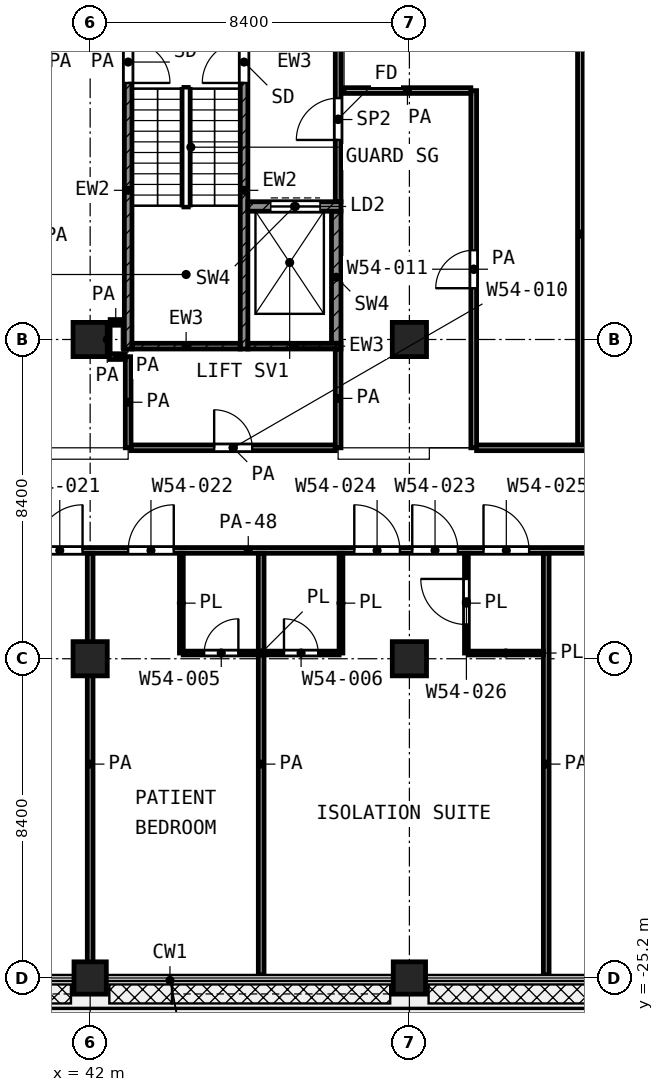
"""IFC4 building model, lengths in metres.
Left out: names, types, materials, properties, quantities, classifications, styles, units other than length and angle.
Written with IfcOpenShell. Run it as: python <this file> out.ifc"""

import sys

from ifc_helpers import new_model, si_unit, direction, frame, frame_2d, origin, origin_2d, place, context, subcontext, project, spatial, rectangle, extrude, element, fill, save


model = new_model("IFC4")
c1 = context("Model", 3, precision=1e-05, world=origin(), true_north=direction((0.0, 1.0)))
c2 = subcontext(c1, "Body", "Model", "MODEL_VIEW")
j1 = project(units=[si_unit("LENGTHUNIT", "METRE"), si_unit("PLANEANGLEUNIT", "RADIAN")], contexts=[c1])
p1 = place(None, origin())
s1 = spatial("IfcSite", under=j1, at=p1, CompositionType="ELEMENT")
p2 = place(p1, origin())
s2 = spatial("IfcBuilding", under=s1, at=p2, CompositionType="ELEMENT")
p3 = place(p2, frame((0.0, 0.0, 255.8)))
s3 = spatial("IfcBuildingStorey", under=s2, at=p3, CompositionType="ELEMENT", Elevation=255.8)
for number, where, z_axis, x_axis in (
    (1, (42.0, -8.4, 0.0), (0.0, 0.0, 1.0), (1.0, 0.0, 0.0)),
    (2, (50.4, -8.4, 0.0), (0.0, 0.0, 1.0), (1.0, 0.0, 0.0)),
    (3, (42.0, -16.8, 0.0), (0.0, 0.0, 1.0), (1.0, 0.0, 0.0)),
    (4, (50.4, -16.8, 0.0), (0.0, 0.0, 1.0), (1.0, 0.0, 0.0)),
):
    element("IfcColumn", number, at=place(p3, frame(where, z_axis=z_axis, x_axis=x_axis)), inside=s3, PredefinedType="COLUMN", context=c2, shape_type="SweptSolid", body=[
        extrude(rectangle(XDim=0.9, YDim=0.9, at=origin_2d()), origin(), (0.0, 0.0, 1.0), 4.2),
    ])
for number, where, z_axis, x_axis in (
    (5, (42.0, -25.2, 0.0), (0.0, 0.0, 1.0), (1.0, 0.0, 0.0)),
    (6, (50.4, -25.2, 0.0), (0.0, 0.0, 1.0), (1.0, 0.0, 0.0)),
):
    element("IfcColumn", number, at=place(p3, frame(where, z_axis=z_axis, x_axis=x_axis)), inside=s3, PredefinedType="COLUMN", context=c2, shape_type="SweptSolid", body=[
        extrude(rectangle(XDim=0.85, YDim=0.85, at=origin_2d()), origin(), (0.0, 0.0, 1.0), 4.2),
    ])
p4 = place(p3, frame((43.0, -8.65, 0.0), z_axis=(0.0, 0.0, 1.0), x_axis=(0.0, 1.0, 0.0)))
e7 = element("IfcWall", 7, at=p4, inside=s3, PredefinedType="SHEAR", context=c2, shape_type="SweptSolid", body=[
    extrude(rectangle(XDim=8.35, YDim=0.2, at=frame_2d((4.175, 0.0))), origin(), (0.0, 0.0, 1.0), 3.6),
])
p5 = place(p4, frame((7.0, 0.0, 0.0)))
e8 = element("IfcOpeningElement", 8, at=p5, cuts=e7, PredefinedType="OPENING", context=c2, shape_type="SweptSolid", body=[
    extrude(rectangle(XDim=1.1, YDim=2.1, at=frame_2d((0.55, 1.05))), frame((0.0, 0.11, 0.0), z_axis=(0.0, -1.0, 0.0), x_axis=(1.0, 0.0, 0.0)), (0.0, 0.0, 1.0), 0.22),
])
p6 = place(p3, frame((46.05, -8.65, 0.0), z_axis=(0.0, 0.0, 1.0), x_axis=(0.0, 1.0, 0.0)))
e9 = element("IfcWall", 9, at=p6, inside=s3, PredefinedType="SHEAR", context=c2, shape_type="SweptSolid", body=[
    extrude(rectangle(XDim=8.35, YDim=0.2, at=frame_2d((4.175, 0.0))), origin(), (0.0, 0.0, 1.0), 3.6),
])
p7 = place(p6, frame((7.0, 0.0, 0.0)))
e10 = element("IfcOpeningElement", 10, at=p7, cuts=e9, PredefinedType="OPENING", context=c2, shape_type="SweptSolid", body=[
    extrude(rectangle(XDim=1.1, YDim=2.1, at=frame_2d((0.55, 1.05))), frame((0.0, 0.11, 0.0), z_axis=(0.0, -1.0, 0.0), x_axis=(1.0, 0.0, 0.0)), (0.0, 0.0, 1.0), 0.22),
])
p8 = place(p3, frame((43.1, -8.575, 0.0), z_axis=(0.0, 0.0, 1.0), x_axis=(1.0, 0.0, 0.0)))
e11 = element("IfcWall", 11, at=p8, inside=s3, PredefinedType="SHEAR", context=c2, shape_type="SweptSolid", body=[
    extrude(rectangle(XDim=2.85, YDim=0.15, at=frame_2d((1.425, 0.0))), origin(), (0.0, 0.0, 1.0), 3.6),
])
p9 = place(p3, frame((46.15, -8.575, 0.0), z_axis=(0.0, 0.0, 1.0), x_axis=(1.0, 0.0, 0.0)))
e12 = element("IfcWall", 12, at=p9, inside=s3, PredefinedType="SHEAR", context=c2, shape_type="SweptSolid", body=[
    extrude(rectangle(XDim=2.45, YDim=0.15, at=frame_2d((1.225, 0.0))), origin(), (0.0, 0.0, 1.0), 3.6),
])
p10 = place(p3, frame((46.15, -4.9, 0.0), z_axis=(0.0, 0.0, 1.0), x_axis=(1.0, 0.0, 0.0)))
e13 = element("IfcWall", 13, at=p10, inside=s3, PredefinedType="SHEAR", context=c2, shape_type="SweptSolid", body=[
    extrude(rectangle(XDim=2.45, YDim=0.25, at=frame_2d((1.225, 0.0))), origin(), (0.0, 0.0, 1.0), 3.6),
])
p11 = place(p10, frame((0.6, 0.0, 0.0)))
e14 = element("IfcOpeningElement", 14, at=p11, cuts=e13, PredefinedType="OPENING", context=c2, shape_type="SweptSolid", body=[
    extrude(rectangle(XDim=1.3, YDim=2.1, at=frame_2d((0.65, 1.05))), frame((0.0, 0.135, 0.0), z_axis=(0.0, -1.0, 0.0), x_axis=(1.0, 0.0, 0.0)), (0.0, 0.0, 1.0), 0.27),
])
p12 = place(p3, frame((48.475, -8.5, 0.0), z_axis=(0.0, 0.0, 1.0), x_axis=(0.0, 1.0, 0.0)))
e15 = element("IfcWall", 15, at=p12, inside=s3, PredefinedType="SHEAR", context=c2, shape_type="SweptSolid", body=[
    extrude(rectangle(XDim=3.475, YDim=0.25, at=frame_2d((1.738, 0.0))), origin(), (0.0, 0.0, 1.0), 3.6),
])
p13 = place(p3, frame((48.525, -4.775, 0.0), z_axis=(0.0, 0.0, 1.0), x_axis=(0.0, 1.0, 0.0)))
e16 = element("IfcWall", 16, at=p13, inside=s3, PredefinedType="PARTITIONING", context=c2, shape_type="SweptSolid", body=[
    extrude(rectangle(XDim=4.325, YDim=0.15, at=frame_2d((2.163, 0.0))), origin(), (0.0, 0.0, 1.0), 3.6),
])
p14 = place(p13, frame((1.625, 0.0, 0.0)))
e17 = element("IfcOpeningElement", 17, at=p14, cuts=e16, PredefinedType="OPENING", context=c2, shape_type="SweptSolid", body=[
    extrude(rectangle(XDim=1.1, YDim=2.1, at=frame_2d((0.55, 1.05))), frame((0.0, 0.085, 0.0), z_axis=(0.0, -1.0, 0.0), x_axis=(1.0, 0.0, 0.0)), (0.0, 0.0, 1.0), 0.17),
])
p15 = place(p3, frame((44.45, -16.65, 0.0), z_axis=(0.0, 0.0, 1.0), x_axis=(1.0, 0.0, 0.0)))
e18 = element("IfcWall", 18, at=p15, inside=s3, PredefinedType="PARTITIONING", context=c2, shape_type="SweptSolid", body=[
    extrude(rectangle(XDim=4.1, YDim=0.1, at=frame_2d((2.05, 0.0))), origin(), (0.0, 0.0, 1.0), 3.6),
])
p16 = place(p15, frame((0.55, 0.0, 0.0)))
e19 = element("IfcOpeningElement", 19, at=p16, cuts=e18, PredefinedType="OPENING", context=c2, shape_type="SweptSolid", body=[
    extrude(rectangle(XDim=0.9, YDim=2.1, at=frame_2d((0.45, 1.05))), frame((0.0, 0.06, 0.0), z_axis=(0.0, -1.0, 0.0), x_axis=(1.0, 0.0, 0.0)), (0.0, 0.0, 1.0), 0.12),
])
p17 = place(p15, frame((2.65, 0.0, 0.0)))
e20 = element("IfcOpeningElement", 20, at=p17, cuts=e18, PredefinedType="OPENING", context=c2, shape_type="SweptSolid", body=[
    extrude(rectangle(XDim=0.9, YDim=2.1, at=frame_2d((0.45, 1.05))), frame((0.0, 0.06, 0.0), z_axis=(0.0, -1.0, 0.0), x_axis=(1.0, 0.0, 0.0)), (0.0, 0.0, 1.0), 0.12),
])
p18 = place(p3, frame((51.95, -16.65, 0.0), z_axis=(0.0, 0.0, 1.0), x_axis=(1.0, 0.0, 0.0)))
e21 = element("IfcWall", 21, at=p18, inside=s3, PredefinedType="PARTITIONING", context=c2, shape_type="SweptSolid", body=[
    extrude(rectangle(XDim=1.975, YDim=0.1, at=frame_2d((0.988, 0.0))), origin(), (0.0, 0.0, 1.0), 3.6),
])
for number, where, z_axis, x_axis in (
    (22, (44.4, -16.65, 0.0), (0.0, 0.0, 1.0), (0.0, 1.0, 0.0)),
    (23, (48.6, -16.65, 0.0), (0.0, 0.0, 1.0), (0.0, 1.0, 0.0)),
):
    element("IfcWall", number, at=place(p3, frame(where, z_axis=z_axis, x_axis=x_axis)), inside=s3, PredefinedType="PARTITIONING", context=c2, shape_type="SweptSolid", body=[
        extrude(rectangle(XDim=2.625, YDim=0.1, at=frame_2d((1.312, 0.0))), origin(), (0.0, 0.0, 1.0), 3.6),
    ])
p19 = place(p3, frame((51.9, -16.65, 0.0), z_axis=(0.0, 0.0, 1.0), x_axis=(0.0, 1.0, 0.0)))
e24 = element("IfcWall", 24, at=p19, inside=s3, PredefinedType="PARTITIONING", context=c2, shape_type="SweptSolid", body=[
    extrude(rectangle(XDim=2.625, YDim=0.1, at=frame_2d((1.312, 0.0))), origin(), (0.0, 0.0, 1.0), 3.6),
])
p20 = place(p19, frame((0.75, 0.0, 0.0)))
e25 = element("IfcOpeningElement", 25, at=p20, cuts=e24, PredefinedType="OPENING", context=c2, shape_type="SweptSolid", body=[
    extrude(rectangle(XDim=1.2, YDim=2.1, at=frame_2d((0.6, 1.05))), frame((0.0, 0.06, 0.0), z_axis=(0.0, -1.0, 0.0), x_axis=(1.0, 0.0, 0.0)), (0.0, 0.0, 1.0), 0.12),
])
p21 = place(p3, frame((29.4, -13.95, 0.0), z_axis=(0.0, 0.0, 1.0), x_axis=(1.0, 0.0, 0.0)))
e26 = element("IfcWall", 26, at=p21, inside=s3, PredefinedType="PARTITIONING", context=c2, shape_type="SweptSolid", body=[
    extrude(rectangle(XDim=33.52, YDim=0.15, at=frame_2d((16.76, 0.0))), origin(), (0.0, 0.0, 1.0), 2.7),
])
p22 = place(p21, frame((3.45, 0.0, 0.0)))
e27 = element("IfcOpeningElement", 27, at=p22, cuts=e26, PredefinedType="OPENING", context=c2, shape_type="SweptSolid", body=[
    extrude(rectangle(XDim=1.2, YDim=2.1, at=frame_2d((0.6, 1.05))), frame((0.0, 0.085, 0.0), z_axis=(0.0, -1.0, 0.0), x_axis=(1.0, 0.0, 0.0)), (0.0, 0.0, 1.0), 0.17),
])
p23 = place(p21, frame((11.2, 0.0, 0.0)))
e28 = element("IfcOpeningElement", 28, at=p23, cuts=e26, PredefinedType="OPENING", context=c2, shape_type="SweptSolid", body=[
    extrude(rectangle(XDim=1.2, YDim=2.1, at=frame_2d((0.6, 1.05))), frame((0.0, 0.085, 0.0), z_axis=(0.0, -1.0, 0.0), x_axis=(1.0, 0.0, 0.0)), (0.0, 0.0, 1.0), 0.17),
])
p24 = place(p21, frame((13.6, 0.0, 0.0)))
e29 = element("IfcOpeningElement", 29, at=p24, cuts=e26, PredefinedType="OPENING", context=c2, shape_type="SweptSolid", body=[
    extrude(rectangle(XDim=1.2, YDim=2.1, at=frame_2d((0.6, 1.05))), frame((0.0, 0.085, 0.0), z_axis=(0.0, -1.0, 0.0), x_axis=(1.0, 0.0, 0.0)), (0.0, 0.0, 1.0), 0.17),
])
p25 = place(p21, frame((21.075, 0.0, 0.0)))
e30 = element("IfcOpeningElement", 30, at=p25, cuts=e26, PredefinedType="OPENING", context=c2, shape_type="SweptSolid", body=[
    extrude(rectangle(XDim=1.2, YDim=2.1, at=frame_2d((0.6, 1.05))), frame((0.0, 0.085, 0.0), z_axis=(0.0, -1.0, 0.0), x_axis=(1.0, 0.0, 0.0)), (0.0, 0.0, 1.0), 0.17),
])
p26 = place(p21, frame((19.55, 0.0, 0.0)))
e31 = element("IfcOpeningElement", 31, at=p26, cuts=e26, PredefinedType="OPENING", context=c2, shape_type="SweptSolid", body=[
    extrude(rectangle(XDim=1.2, YDim=2.1, at=frame_2d((0.6, 1.05))), frame((0.0, 0.085, 0.0), z_axis=(0.0, -1.0, 0.0), x_axis=(1.0, 0.0, 0.0)), (0.0, 0.0, 1.0), 0.17),
])
p27 = place(p21, frame((22.95, 0.0, 0.0)))
e32 = element("IfcOpeningElement", 32, at=p27, cuts=e26, PredefinedType="OPENING", context=c2, shape_type="SweptSolid", body=[
    extrude(rectangle(XDim=1.2, YDim=2.1, at=frame_2d((0.6, 1.05))), frame((0.0, 0.085, 0.0), z_axis=(0.0, -1.0, 0.0), x_axis=(1.0, 0.0, 0.0)), (0.0, 0.0, 1.0), 0.17),
])
p28 = place(p21, frame((28.35, 0.0, 0.0)))
e33 = element("IfcOpeningElement", 33, at=p28, cuts=e26, PredefinedType="OPENING", context=c2, shape_type="SweptSolid", body=[
    extrude(rectangle(XDim=1.5, YDim=2.1, at=frame_2d((0.75, 1.05))), frame((0.0, 0.085, 0.0), z_axis=(0.0, -1.0, 0.0), x_axis=(1.0, 0.0, 0.0)), (0.0, 0.0, 1.0), 0.17),
])
p29 = place(p3, frame((43.075, -11.25, 0.0), z_axis=(0.0, 0.0, 1.0), x_axis=(1.0, 0.0, 0.0)))
e34 = element("IfcWall", 34, at=p29, inside=s3, PredefinedType="PARTITIONING", context=c2, shape_type="SweptSolid", body=[
    extrude(rectangle(XDim=5.375, YDim=0.15, at=frame_2d((2.688, 0.0))), origin(), (0.0, 0.0, 1.0), 3.6),
])
p30 = place(p29, frame((2.188, 0.0, 0.0)))
e35 = element("IfcOpeningElement", 35, at=p30, cuts=e34, PredefinedType="OPENING", context=c2, shape_type="SweptSolid", body=[
    extrude(rectangle(XDim=1.0, YDim=2.1, at=frame_2d((0.5, 1.05))), frame((0.0, 0.085, 0.0), z_axis=(0.0, -1.0, 0.0), x_axis=(1.0, 0.0, 0.0)), (0.0, 0.0, 1.0), 0.17),
])
p31 = place(p3, frame((52.168, -11.25, 0.0), z_axis=(0.0, 0.0, 1.0), x_axis=(1.0, 0.0, 0.0)))
e36 = element("IfcWall", 36, at=p31, inside=s3, PredefinedType="PARTITIONING", context=c2, shape_type="SweptSolid", body=[
    extrude(rectangle(XDim=10.752, YDim=0.15, at=frame_2d((5.376, 0.0))), origin(), (0.0, 0.0, 1.0), 2.7),
])
p32 = place(p31, frame((6.032, 0.0, 0.0)))
e37 = element("IfcOpeningElement", 37, at=p32, cuts=e36, PredefinedType="OPENING", context=c2, shape_type="SweptSolid", body=[
    extrude(rectangle(XDim=1.5, YDim=2.1, at=frame_2d((0.75, 1.05))), frame((0.0, 0.085, 0.0), z_axis=(0.0, -1.0, 0.0), x_axis=(1.0, 0.0, 0.0)), (0.0, 0.0, 1.0), 0.17),
])
p33 = place(p3, frame((42.525, -8.85, 0.0), z_axis=(0.0, 0.0, 1.0), x_axis=(1.0, 0.0, 0.0)))
e38 = element("IfcWall", 38, at=p33, inside=s3, PredefinedType="PARTITIONING", context=c2, shape_type="SweptSolid", body=[
    extrude(rectangle(XDim=0.398, YDim=0.15, at=frame_2d((0.199, 0.0))), origin(), (0.0, 0.0, 1.0), 3.6),
])
p34 = place(p3, frame((42.526, -7.95, 0.0), z_axis=(0.0, 0.0, 1.0), x_axis=(1.0, 0.0, 0.0)))
e39 = element("IfcWall", 39, at=p34, inside=s3, PredefinedType="PARTITIONING", context=c2, shape_type="SweptSolid", body=[
    extrude(rectangle(XDim=0.294, YDim=0.15, at=frame_2d((0.147, 0.0))), origin(), (0.0, 0.0, 1.0), 3.6),
])
p35 = place(p3, frame((48.68, -1.85, 0.0), z_axis=(0.0, 0.0, 1.0), x_axis=(1.0, 0.0, 0.0)))
e40 = element("IfcWall", 40, at=p35, inside=s3, PredefinedType="PARTITIONING", context=c2, shape_type="SweptSolid", body=[
    extrude(rectangle(XDim=3.337, YDim=0.15, at=frame_2d((1.668, 0.0))), origin(), (0.0, 0.0, 1.0), 3.6),
])
p36 = place(p3, frame((42.0, -25.12, 0.0), z_axis=(0.0, 0.0, 1.0), x_axis=(0.0, 1.0, 0.0)))
e41 = element("IfcWall", 41, at=p36, inside=s3, PredefinedType="PARTITIONING", context=c2, shape_type="SweptSolid", body=[
    extrude(rectangle(XDim=11.095, YDim=0.15, at=frame_2d((5.548, 0.0))), origin(), (0.0, 0.0, 1.0), 3.6),
])
p37 = place(p3, frame((42.45, -8.85, 0.0), z_axis=(0.0, 0.0, 1.0), x_axis=(0.0, 1.0, 0.0)))
e42 = element("IfcWall", 42, at=p37, inside=s3, PredefinedType="PARTITIONING", context=c2, shape_type="SweptSolid", body=[
    extrude(rectangle(XDim=0.899, YDim=0.15, at=frame_2d((0.45, 0.0))), origin(), (0.0, 0.0, 1.0), 3.6),
])
p38 = place(p3, frame((43.0, -11.25, 0.0), z_axis=(0.0, 0.0, 1.0), x_axis=(0.0, 1.0, 0.0)))
e43 = element("IfcWall", 43, at=p38, inside=s3, PredefinedType="PARTITIONING", context=c2, shape_type="SweptSolid", body=[
    extrude(rectangle(XDim=2.398, YDim=0.15, at=frame_2d((1.199, 0.0))), origin(), (0.0, 0.0, 1.0), 3.6),
])
p39 = place(p3, frame((46.5, -25.12, 0.0), z_axis=(0.0, 0.0, 1.0), x_axis=(0.0, 1.0, 0.0)))
e44 = element("IfcWall", 44, at=p39, inside=s3, PredefinedType="PARTITIONING", context=c2, shape_type="SweptSolid", body=[
    extrude(rectangle(XDim=11.095, YDim=0.15, at=frame_2d((5.548, 0.0))), origin(), (0.0, 0.0, 1.0), 3.6),
])
p40 = place(p3, frame((48.525, -11.25, 0.0), z_axis=(0.0, 0.0, 1.0), x_axis=(0.0, 1.0, 0.0)))
e45 = element("IfcWall", 45, at=p40, inside=s3, PredefinedType="PARTITIONING", context=c2, shape_type="SweptSolid", body=[
    extrude(rectangle(XDim=2.6, YDim=0.15, at=frame_2d((1.3, 0.0))), origin(), (0.0, 0.0, 1.0), 3.6),
])
p41 = place(p3, frame((52.093, -11.25, 0.0), z_axis=(0.0, 0.0, 1.0), x_axis=(0.0, 1.0, 0.0)))
e46 = element("IfcWall", 46, at=p41, inside=s3, PredefinedType="PARTITIONING", context=c2, shape_type="SweptSolid", body=[
    extrude(rectangle(XDim=9.398, YDim=0.15, at=frame_2d((4.699, 0.0))), origin(), (0.0, 0.0, 1.0), 3.6),
])
p42 = place(p41, frame((4.199, 0.0, 0.0)))
e47 = element("IfcOpeningElement", 47, at=p42, cuts=e46, PredefinedType="OPENING", context=c2, shape_type="SweptSolid", body=[
    extrude(rectangle(XDim=1.0, YDim=2.1, at=frame_2d((0.5, 1.05))), frame((0.0, 0.085, 0.0), z_axis=(0.0, -1.0, 0.0), x_axis=(1.0, 0.0, 0.0)), (0.0, 0.0, 1.0), 0.17),
])
p43 = place(p3, frame((54.0, -25.12, 0.0), z_axis=(0.0, 0.0, 1.0), x_axis=(0.0, 1.0, 0.0)))
e48 = element("IfcWall", 48, at=p43, inside=s3, PredefinedType="PARTITIONING", context=c2, shape_type="SweptSolid", body=[
    extrude(rectangle(XDim=11.095, YDim=0.15, at=frame_2d((5.548, 0.0))), origin(), (0.0, 0.0, 1.0), 3.6),
])
p44 = place(p3, frame((54.9, -11.175, 0.0), z_axis=(0.0, 0.0, 1.0), x_axis=(0.0, 1.0, 0.0)))
e49 = element("IfcWall", 49, at=p44, inside=s3, PredefinedType="PARTITIONING", context=c2, shape_type="SweptSolid", body=[
    extrude(rectangle(XDim=11.095, YDim=0.15, at=frame_2d((5.547, 0.0))), origin(), (0.0, 0.0, 1.0), 3.6),
])
p45 = place(p5, frame((1.1, 0.0, 0.0), z_axis=(0.0, 0.0, 1.0), x_axis=(-1.0, 0.0, 0.0)))
e50 = element("IfcDoor", 50, at=p45, inside=s3, OperationType="SINGLE_SWING_LEFT", PredefinedType="DOOR", context=c2, shape_type="SweptSolid", body=[
    extrude(rectangle(XDim=1.1, YDim=2.1, at=frame_2d((0.55, 1.05))), frame((0.0, 0.025, 0.0), z_axis=(0.0, -1.0, 0.0), x_axis=(1.0, 0.0, 0.0)), (0.0, 0.0, 1.0), 0.05),
])
fill(e8, e50)
p46 = place(p7, origin())
e51 = element("IfcDoor", 51, at=p46, inside=s3, OperationType="SINGLE_SWING_LEFT", PredefinedType="DOOR", context=c2, shape_type="SweptSolid", body=[
    extrude(rectangle(XDim=1.1, YDim=2.1, at=frame_2d((0.55, 1.05))), frame((0.0, 0.025, 0.0), z_axis=(0.0, -1.0, 0.0), x_axis=(1.0, 0.0, 0.0)), (0.0, 0.0, 1.0), 0.05),
])
fill(e10, e51)
p47 = place(p11, origin())
e52 = element("IfcDoor", 52, at=p47, inside=s3, OperationType="DOUBLE_DOOR_SLIDING", PredefinedType="DOOR", context=c2, shape_type="SweptSolid", body=[
    extrude(rectangle(XDim=1.3, YDim=2.1, at=frame_2d((0.65, 1.05))), frame((0.0, 0.025, 0.0), z_axis=(0.0, -1.0, 0.0), x_axis=(1.0, 0.0, 0.0)), (0.0, 0.0, 1.0), 0.05),
])
fill(e14, e52)
p48 = place(p14, origin())
e53 = element("IfcDoor", 53, at=p48, inside=s3, OperationType="SINGLE_SWING_LEFT", PredefinedType="DOOR", context=c2, shape_type="SweptSolid", body=[
    extrude(rectangle(XDim=1.1, YDim=2.1, at=frame_2d((0.55, 1.05))), frame((0.0, 0.025, 0.0), z_axis=(0.0, -1.0, 0.0), x_axis=(1.0, 0.0, 0.0)), (0.0, 0.0, 1.0), 0.05),
])
fill(e17, e53)
p49 = place(p30, origin())
e54 = element("IfcDoor", 54, at=p49, inside=s3, OperationType="SINGLE_SWING_LEFT", PredefinedType="DOOR", context=c2, shape_type="SweptSolid", body=[
    extrude(rectangle(XDim=1.0, YDim=2.1, at=frame_2d((0.5, 1.05))), frame((0.0, 0.025, 0.0), z_axis=(0.0, -1.0, 0.0), x_axis=(1.0, 0.0, 0.0)), (0.0, 0.0, 1.0), 0.05),
])
fill(e35, e54)
p50 = place(p42, origin())
e55 = element("IfcDoor", 55, at=p50, inside=s3, OperationType="SINGLE_SWING_LEFT", PredefinedType="DOOR", context=c2, shape_type="SweptSolid", body=[
    extrude(rectangle(XDim=1.0, YDim=2.1, at=frame_2d((0.5, 1.05))), frame((0.0, 0.025, 0.0), z_axis=(0.0, -1.0, 0.0), x_axis=(1.0, 0.0, 0.0)), (0.0, 0.0, 1.0), 0.05),
])
fill(e47, e55)
p51 = place(p23, origin())
e56 = element("IfcDoor", 56, at=p51, inside=s3, OperationType="SINGLE_SWING_RIGHT", PredefinedType="DOOR", context=c2, shape_type="SweptSolid", body=[
    extrude(rectangle(XDim=1.2, YDim=2.1, at=frame_2d((0.6, 1.05))), frame((0.0, 0.025, 0.0), z_axis=(0.0, -1.0, 0.0), x_axis=(1.0, 0.0, 0.0)), (0.0, 0.0, 1.0), 0.05),
])
fill(e28, e56)
p52 = place(p24, origin())
e57 = element("IfcDoor", 57, at=p52, inside=s3, OperationType="SINGLE_SWING_RIGHT", PredefinedType="DOOR", context=c2, shape_type="SweptSolid", body=[
    extrude(rectangle(XDim=1.2, YDim=2.1, at=frame_2d((0.6, 1.05))), frame((0.0, 0.025, 0.0), z_axis=(0.0, -1.0, 0.0), x_axis=(1.0, 0.0, 0.0)), (0.0, 0.0, 1.0), 0.05),
])
fill(e29, e57)
p53 = place(p16, origin())
e58 = element("IfcDoor", 58, at=p53, inside=s3, OperationType="SINGLE_SWING_RIGHT", PredefinedType="DOOR", context=c2, shape_type="SweptSolid", body=[
    extrude(rectangle(XDim=0.9, YDim=2.1, at=frame_2d((0.45, 1.05))), frame((0.0, 0.025, 0.0), z_axis=(0.0, -1.0, 0.0), x_axis=(1.0, 0.0, 0.0)), (0.0, 0.0, 1.0), 0.05),
])
fill(e19, e58)
p54 = place(p25, origin())
e59 = element("IfcDoor", 59, at=p54, inside=s3, OperationType="SINGLE_SWING_LEFT", PredefinedType="DOOR", context=c2, shape_type="SweptSolid", body=[
    extrude(rectangle(XDim=1.2, YDim=2.1, at=frame_2d((0.6, 1.05))), frame((0.0, 0.025, 0.0), z_axis=(0.0, -1.0, 0.0), x_axis=(1.0, 0.0, 0.0)), (0.0, 0.0, 1.0), 0.05),
])
fill(e30, e59)
p55 = place(p26, origin())
e60 = element("IfcDoor", 60, at=p55, inside=s3, OperationType="SINGLE_SWING_LEFT", PredefinedType="DOOR", context=c2, shape_type="SweptSolid", body=[
    extrude(rectangle(XDim=1.2, YDim=2.1, at=frame_2d((0.6, 1.05))), frame((0.0, 0.025, 0.0), z_axis=(0.0, -1.0, 0.0), x_axis=(1.0, 0.0, 0.0)), (0.0, 0.0, 1.0), 0.05),
])
fill(e31, e60)
p56 = place(p27, origin())
e61 = element("IfcDoor", 61, at=p56, inside=s3, OperationType="SINGLE_SWING_LEFT", PredefinedType="DOOR", context=c2, shape_type="SweptSolid", body=[
    extrude(rectangle(XDim=1.2, YDim=2.1, at=frame_2d((0.6, 1.05))), frame((0.0, 0.025, 0.0), z_axis=(0.0, -1.0, 0.0), x_axis=(1.0, 0.0, 0.0)), (0.0, 0.0, 1.0), 0.05),
])
fill(e32, e61)
p57 = place(p20, origin())
e62 = element("IfcDoor", 62, at=p57, inside=s3, OperationType="SINGLE_SWING_RIGHT", PredefinedType="DOOR", context=c2, shape_type="SweptSolid", body=[
    extrude(rectangle(XDim=1.2, YDim=2.1, at=frame_2d((0.6, 1.05))), frame((0.0, 0.025, 0.0), z_axis=(0.0, -1.0, 0.0), x_axis=(1.0, 0.0, 0.0)), (0.0, 0.0, 1.0), 0.05),
])
fill(e25, e62)
p58 = place(p17, origin())
e63 = element("IfcDoor", 63, at=p58, inside=s3, OperationType="SINGLE_SWING_LEFT", PredefinedType="DOOR", context=c2, shape_type="SweptSolid", body=[
    extrude(rectangle(XDim=0.9, YDim=2.1, at=frame_2d((0.45, 1.05))), frame((0.0, 0.025, 0.0), z_axis=(0.0, -1.0, 0.0), x_axis=(1.0, 0.0, 0.0)), (0.0, 0.0, 1.0), 0.05),
])
fill(e20, e63)
save(model, sys.argv[1])
